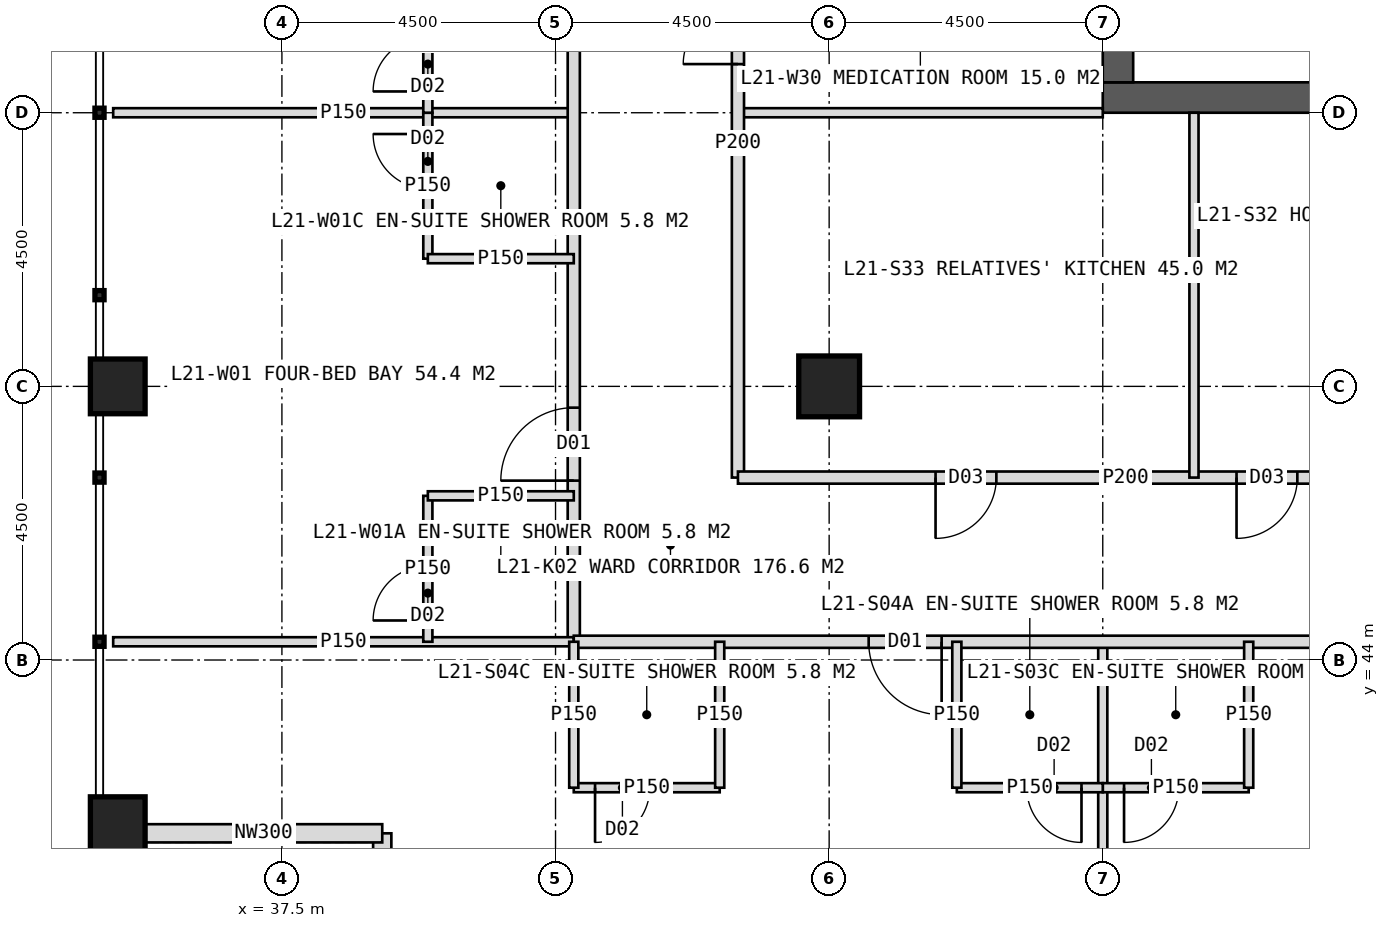
"""IFC4 building model, lengths in metres.
Left out: names, types, materials, properties, quantities, classifications, styles, units other than length and angle.
Written with IfcOpenShell. Run it as: python <this file> out.ifc"""

import sys

from ifc_helpers import new_model, si_unit, direction, frame, frame_2d, origin, origin_2d, place, context, subcontext, project, spatial, rectangle, hollow_rectangle, extrude, element, fill, save


model = new_model("IFC4")
c1 = context("Model", 3, precision=1e-05, world=origin(), true_north=direction((0.0, 1.0)))
c2 = subcontext(c1, "Body", "Model", "MODEL_VIEW")
j1 = project(units=[si_unit("LENGTHUNIT", "METRE"), si_unit("PLANEANGLEUNIT", "RADIAN")], contexts=[c1])
p1 = place(None, origin())
s1 = spatial("IfcSite", under=j1, at=p1, CompositionType="ELEMENT")
p2 = place(p1, origin())
s2 = spatial("IfcBuilding", under=s1, at=p2, CompositionType="ELEMENT")
p3 = place(p2, frame((0.0, 0.0, 91.0)))
s3 = spatial("IfcBuildingStorey", under=s2, at=p3, CompositionType="ELEMENT", Elevation=91.0)
p4 = place(p3, frame((51.0, 53.25, 0.0), z_axis=(0.0, 0.0, 1.0), x_axis=(1.0, 0.0, 0.0)))
e1 = element("IfcWall", 1, at=p4, inside=s3, PredefinedType="SHEAR", context=c2, shape_type="SweptSolid", body=[
    extrude(rectangle(XDim=18.0, YDim=0.5, at=frame_2d((9.0, 0.0))), origin(), (0.0, 0.0, 1.0), 4.0),
])
p5 = place(p4, frame((8.1, 0.0, 0.0)))
e2 = element("IfcOpeningElement", 2, at=p5, cuts=e1, PredefinedType="OPENING", context=c2, shape_type="SweptSolid", body=[
    extrude(rectangle(XDim=1.8, YDim=2.2, at=frame_2d((0.9, 1.1))), frame((0.0, 0.26, 0.0), z_axis=(0.0, -1.0, 0.0), x_axis=(1.0, 0.0, 0.0)), (0.0, 0.0, 1.0), 0.52),
])
p6 = place(p3, frame((51.25, 53.5, 0.0), z_axis=(0.0, 0.0, 1.0), x_axis=(0.0, 1.0, 0.0)))
e3 = element("IfcWall", 3, at=p6, inside=s3, PredefinedType="SHEAR", context=c2, shape_type="SweptSolid", body=[
    extrude(rectangle(XDim=17.0, YDim=0.5, at=frame_2d((8.5, 0.0))), origin(), (0.0, 0.0, 1.0), 4.0),
])
p7 = place(p6, frame((6.0, 0.0, 0.0)))
e4 = element("IfcOpeningElement", 4, at=p7, cuts=e3, PredefinedType="OPENING", context=c2, shape_type="SweptSolid", body=[
    extrude(rectangle(XDim=1.5, YDim=2.2, at=frame_2d((0.75, 1.1))), frame((0.0, 0.26, 0.0), z_axis=(0.0, -1.0, 0.0), x_axis=(1.0, 0.0, 0.0)), (0.0, 0.0, 1.0), 0.52),
])
p8 = place(p3, frame((46.5, 48.5, 0.0), z_axis=(0.0, 0.0, 1.0), x_axis=(1.0, 0.0, 0.0)))
e5 = element("IfcColumn", 5, at=p8, inside=s3, PredefinedType="COLUMN", context=c2, shape_type="SweptSolid", body=[
    extrude(hollow_rectangle(XDim=1.0, YDim=1.0, WallThickness=0.1, at=origin_2d()), origin(), (0.0, 0.0, 1.0), 4.0),
])
for number, where, z_axis, x_axis in (
    (6, (34.8, 41.3, 0.0), (0.0, 0.0, 1.0), (1.0, 0.0, 0.0)),
    (7, (34.8, 48.5, 0.0), (0.0, 0.0, 1.0), (1.0, 0.0, 0.0)),
):
    element("IfcColumn", number, at=place(p3, frame(where, z_axis=z_axis, x_axis=x_axis)), inside=s3, PredefinedType="COLUMN", context=c2, shape_type="SweptSolid", body=[
        extrude(hollow_rectangle(XDim=0.9, YDim=0.9, WallThickness=0.08, at=origin_2d()), origin(), (0.0, 0.0, 1.0), 4.0),
    ])
for number, where, z_axis, x_axis in (
    (8, (39.15, 37.25, 0.0), (0.0, 0.0, 1.0), (0.0, 1.0, 0.0)),
    (9, (39.15, 41.15, 0.0), (0.0, 0.0, 1.0), (-1.0, 0.0, 0.0)),
):
    element("IfcWall", number, at=place(p3, frame(where, z_axis=z_axis, x_axis=x_axis)), inside=s3, PredefinedType="ELEMENTEDWALL", context=c2, shape_type="SweptSolid", body=[
        extrude(rectangle(XDim=3.9, YDim=0.3, at=frame_2d((1.95, 0.0))), origin(), (0.0, 0.0, 1.0), 2.95),
    ])
p9 = place(p3, frame((42.3, 53.0, 0.0), z_axis=(0.0, 0.0, 1.0), x_axis=(-1.0, 0.0, 0.0)))
e10 = element("IfcWall", 10, at=p9, inside=s3, PredefinedType="PARTITIONING", context=c2, shape_type="SweptSolid", body=[
    extrude(rectangle(XDim=7.575, YDim=0.15, at=frame_2d((3.788, 0.0))), origin(), (0.0, 0.0, 1.0), 3.75),
])
p10 = place(p3, frame((42.3, 44.3, 0.0), z_axis=(0.0, 0.0, 1.0), x_axis=(0.0, 1.0, 0.0)))
e11 = element("IfcWall", 11, at=p10, inside=s3, PredefinedType="PARTITIONING", context=c2, shape_type="SweptSolid", body=[
    extrude(rectangle(XDim=35.4, YDim=0.2, at=frame_2d((17.7, 0.0))), origin(), (0.0, 0.0, 1.0), 3.75),
])
p11 = place(p10, frame((2.65, 0.0, 0.0)))
e12 = element("IfcOpeningElement", 12, at=p11, cuts=e11, PredefinedType="OPENING", context=c2, shape_type="SweptSolid", body=[
    extrude(rectangle(XDim=1.2, YDim=2.2, at=frame_2d((0.6, 1.1))), frame((0.0, 0.11, 0.0), z_axis=(0.0, -1.0, 0.0), x_axis=(1.0, 0.0, 0.0)), (0.0, 0.0, 1.0), 0.22),
])
p12 = place(p10, frame((11.35, 0.0, 0.0)))
e13 = element("IfcOpeningElement", 13, at=p12, cuts=e11, PredefinedType="OPENING", context=c2, shape_type="SweptSolid", body=[
    extrude(rectangle(XDim=1.2, YDim=2.2, at=frame_2d((0.6, 1.1))), frame((0.0, 0.11, 0.0), z_axis=(0.0, -1.0, 0.0), x_axis=(1.0, 0.0, 0.0)), (0.0, 0.0, 1.0), 0.22),
])
p13 = place(p10, frame((20.35, 0.0, 0.0)))
e14 = element("IfcOpeningElement", 14, at=p13, cuts=e11, PredefinedType="OPENING", context=c2, shape_type="SweptSolid", body=[
    extrude(rectangle(XDim=1.2, YDim=2.2, at=frame_2d((0.6, 1.1))), frame((0.0, 0.11, 0.0), z_axis=(0.0, -1.0, 0.0), x_axis=(1.0, 0.0, 0.0)), (0.0, 0.0, 1.0), 0.22),
])
p14 = place(p10, frame((26.35, 0.0, 0.0)))
e15 = element("IfcOpeningElement", 15, at=p14, cuts=e11, PredefinedType="OPENING", context=c2, shape_type="SweptSolid", body=[
    extrude(rectangle(XDim=1.2, YDim=2.2, at=frame_2d((0.6, 1.1))), frame((0.0, 0.11, 0.0), z_axis=(0.0, -1.0, 0.0), x_axis=(1.0, 0.0, 0.0)), (0.0, 0.0, 1.0), 0.22),
])
p15 = place(p10, frame((30.85, 0.0, 0.0)))
e16 = element("IfcOpeningElement", 16, at=p15, cuts=e11, PredefinedType="OPENING", context=c2, shape_type="SweptSolid", body=[
    extrude(rectangle(XDim=1.2, YDim=2.2, at=frame_2d((0.6, 1.1))), frame((0.0, 0.11, 0.0), z_axis=(0.0, -1.0, 0.0), x_axis=(1.0, 0.0, 0.0)), (0.0, 0.0, 1.0), 0.22),
])
p16 = place(p3, frame((42.3, 44.3, 0.0), z_axis=(0.0, 0.0, 1.0), x_axis=(-1.0, 0.0, 0.0)))
e17 = element("IfcWall", 17, at=p16, inside=s3, PredefinedType="PARTITIONING", context=c2, shape_type="SweptSolid", body=[
    extrude(rectangle(XDim=7.575, YDim=0.15, at=frame_2d((3.788, 0.0))), origin(), (0.0, 0.0, 1.0), 3.75),
])
p17 = place(p3, frame((39.9, 44.3, 0.0), z_axis=(0.0, 0.0, 1.0), x_axis=(0.0, 1.0, 0.0)))
e18 = element("IfcWall", 18, at=p17, inside=s3, PredefinedType="PARTITIONING", context=c2, shape_type="SweptSolid", body=[
    extrude(rectangle(XDim=2.4, YDim=0.15, at=frame_2d((1.2, 0.0))), origin(), (0.0, 0.0, 1.0), 3.75),
])
p18 = place(p17, frame((0.35, 0.0, 0.0)))
e19 = element("IfcOpeningElement", 19, at=p18, cuts=e18, PredefinedType="OPENING", context=c2, shape_type="SweptSolid", body=[
    extrude(rectangle(XDim=0.9, YDim=2.1, at=frame_2d((0.45, 1.05))), frame((0.0, 0.085, 0.0), z_axis=(0.0, -1.0, 0.0), x_axis=(1.0, 0.0, 0.0)), (0.0, 0.0, 1.0), 0.17),
])
p19 = place(p3, frame((42.3, 46.7, 0.0), z_axis=(0.0, 0.0, 1.0), x_axis=(-1.0, 0.0, 0.0)))
e20 = element("IfcWall", 20, at=p19, inside=s3, PredefinedType="PARTITIONING", context=c2, shape_type="SweptSolid", body=[
    extrude(rectangle(XDim=2.4, YDim=0.15, at=frame_2d((1.2, 0.0))), origin(), (0.0, 0.0, 1.0), 3.75),
])
p20 = place(p3, frame((39.9, 50.6, 0.0), z_axis=(0.0, 0.0, 1.0), x_axis=(0.0, 1.0, 0.0)))
e21 = element("IfcWall", 21, at=p20, inside=s3, PredefinedType="PARTITIONING", context=c2, shape_type="SweptSolid", body=[
    extrude(rectangle(XDim=2.4, YDim=0.15, at=frame_2d((1.2, 0.0))), origin(), (0.0, 0.0, 1.0), 3.75),
])
p21 = place(p20, frame((1.15, 0.0, 0.0)))
e22 = element("IfcOpeningElement", 22, at=p21, cuts=e21, PredefinedType="OPENING", context=c2, shape_type="SweptSolid", body=[
    extrude(rectangle(XDim=0.9, YDim=2.1, at=frame_2d((0.45, 1.05))), frame((0.0, 0.085, 0.0), z_axis=(0.0, -1.0, 0.0), x_axis=(1.0, 0.0, 0.0)), (0.0, 0.0, 1.0), 0.17),
])
p22 = place(p3, frame((42.3, 50.6, 0.0), z_axis=(0.0, 0.0, 1.0), x_axis=(-1.0, 0.0, 0.0)))
e23 = element("IfcWall", 23, at=p22, inside=s3, PredefinedType="PARTITIONING", context=c2, shape_type="SweptSolid", body=[
    extrude(rectangle(XDim=2.4, YDim=0.15, at=frame_2d((1.2, 0.0))), origin(), (0.0, 0.0, 1.0), 3.75),
])
p23 = place(p3, frame((39.9, 53.0, 0.0), z_axis=(0.0, 0.0, 1.0), x_axis=(0.0, 1.0, 0.0)))
e24 = element("IfcWall", 24, at=p23, inside=s3, PredefinedType="PARTITIONING", context=c2, shape_type="SweptSolid", body=[
    extrude(rectangle(XDim=2.4, YDim=0.15, at=frame_2d((1.2, 0.0))), origin(), (0.0, 0.0, 1.0), 3.75),
])
p24 = place(p23, frame((0.35, 0.0, 0.0)))
e25 = element("IfcOpeningElement", 25, at=p24, cuts=e24, PredefinedType="OPENING", context=c2, shape_type="SweptSolid", body=[
    extrude(rectangle(XDim=0.9, YDim=2.1, at=frame_2d((0.45, 1.05))), frame((0.0, 0.085, 0.0), z_axis=(0.0, -1.0, 0.0), x_axis=(1.0, 0.0, 0.0)), (0.0, 0.0, 1.0), 0.17),
])
p25 = place(p3, frame((51.0, 53.0, 0.0), z_axis=(0.0, 0.0, 1.0), x_axis=(-1.0, 0.0, 0.0)))
e26 = element("IfcWall", 26, at=p25, inside=s3, PredefinedType="PARTITIONING", context=c2, shape_type="SweptSolid", body=[
    extrude(rectangle(XDim=6.0, YDim=0.15, at=frame_2d((3.0, 0.0))), origin(), (0.0, 0.0, 1.0), 3.75),
])
p26 = place(p3, frame((45.0, 47.0, 0.0), z_axis=(0.0, 0.0, 1.0), x_axis=(0.0, 1.0, 0.0)))
e27 = element("IfcWall", 27, at=p26, inside=s3, PredefinedType="PARTITIONING", context=c2, shape_type="SweptSolid", body=[
    extrude(rectangle(XDim=11.0, YDim=0.2, at=frame_2d((5.5, 0.0))), origin(), (0.0, 0.0, 1.0), 3.75),
])
p27 = place(p26, frame((6.8, 0.0, 0.0)))
e28 = element("IfcOpeningElement", 28, at=p27, cuts=e27, PredefinedType="OPENING", context=c2, shape_type="SweptSolid", body=[
    extrude(rectangle(XDim=0.9, YDim=2.1, at=frame_2d((0.45, 1.05))), frame((0.0, 0.11, 0.0), z_axis=(0.0, -1.0, 0.0), x_axis=(1.0, 0.0, 0.0)), (0.0, 0.0, 1.0), 0.22),
])
p28 = place(p26, frame((8.75, 0.0, 0.0)))
e29 = element("IfcOpeningElement", 29, at=p28, cuts=e27, PredefinedType="OPENING", context=c2, shape_type="SweptSolid", body=[
    extrude(rectangle(XDim=0.9, YDim=2.1, at=frame_2d((0.45, 1.05))), frame((0.0, 0.11, 0.0), z_axis=(0.0, -1.0, 0.0), x_axis=(1.0, 0.0, 0.0)), (0.0, 0.0, 1.0), 0.22),
])
p29 = place(p3, frame((51.0, 44.3, 0.0), z_axis=(0.0, 0.0, 1.0), x_axis=(0.0, -1.0, 0.0)))
e30 = element("IfcWall", 30, at=p29, inside=s3, PredefinedType="PARTITIONING", context=c2, shape_type="SweptSolid", body=[
    extrude(rectangle(XDim=7.575, YDim=0.15, at=frame_2d((3.788, 0.0))), origin(), (0.0, 0.0, 1.0), 3.75),
])
p30 = place(p3, frame((77.7, 44.3, 0.0), z_axis=(0.0, 0.0, 1.0), x_axis=(-1.0, 0.0, 0.0)))
e31 = element("IfcWall", 31, at=p30, inside=s3, PredefinedType="PARTITIONING", context=c2, shape_type="SweptSolid", body=[
    extrude(rectangle(XDim=35.4, YDim=0.2, at=frame_2d((17.7, 0.0))), origin(), (0.0, 0.0, 1.0), 3.75),
])
p31 = place(p30, frame((2.65, 0.0, 0.0)))
e32 = element("IfcOpeningElement", 32, at=p31, cuts=e31, PredefinedType="OPENING", context=c2, shape_type="SweptSolid", body=[
    extrude(rectangle(XDim=1.2, YDim=2.2, at=frame_2d((0.6, 1.1))), frame((0.0, 0.11, 0.0), z_axis=(0.0, -1.0, 0.0), x_axis=(1.0, 0.0, 0.0)), (0.0, 0.0, 1.0), 0.22),
])
p32 = place(p30, frame((11.35, 0.0, 0.0)))
e33 = element("IfcOpeningElement", 33, at=p32, cuts=e31, PredefinedType="OPENING", context=c2, shape_type="SweptSolid", body=[
    extrude(rectangle(XDim=1.2, YDim=2.2, at=frame_2d((0.6, 1.1))), frame((0.0, 0.11, 0.0), z_axis=(0.0, -1.0, 0.0), x_axis=(1.0, 0.0, 0.0)), (0.0, 0.0, 1.0), 0.22),
])
p33 = place(p30, frame((20.35, 0.0, 0.0)))
e34 = element("IfcOpeningElement", 34, at=p33, cuts=e31, PredefinedType="OPENING", context=c2, shape_type="SweptSolid", body=[
    extrude(rectangle(XDim=1.2, YDim=2.2, at=frame_2d((0.6, 1.1))), frame((0.0, 0.11, 0.0), z_axis=(0.0, -1.0, 0.0), x_axis=(1.0, 0.0, 0.0)), (0.0, 0.0, 1.0), 0.22),
])
p34 = place(p30, frame((29.35, 0.0, 0.0)))
e35 = element("IfcOpeningElement", 35, at=p34, cuts=e31, PredefinedType="OPENING", context=c2, shape_type="SweptSolid", body=[
    extrude(rectangle(XDim=1.2, YDim=2.2, at=frame_2d((0.6, 1.1))), frame((0.0, 0.11, 0.0), z_axis=(0.0, -1.0, 0.0), x_axis=(1.0, 0.0, 0.0)), (0.0, 0.0, 1.0), 0.22),
])
p35 = place(p3, frame((53.4, 41.9, 0.0), z_axis=(0.0, 0.0, 1.0), x_axis=(-1.0, 0.0, 0.0)))
e36 = element("IfcWall", 36, at=p35, inside=s3, PredefinedType="PARTITIONING", context=c2, shape_type="SweptSolid", body=[
    extrude(rectangle(XDim=2.4, YDim=0.15, at=frame_2d((1.2, 0.0))), origin(), (0.0, 0.0, 1.0), 3.75),
])
p36 = place(p35, frame((1.15, 0.0, 0.0)))
e37 = element("IfcOpeningElement", 37, at=p36, cuts=e36, PredefinedType="OPENING", context=c2, shape_type="SweptSolid", body=[
    extrude(rectangle(XDim=0.9, YDim=2.1, at=frame_2d((0.45, 1.05))), frame((0.0, 0.085, 0.0), z_axis=(0.0, -1.0, 0.0), x_axis=(1.0, 0.0, 0.0)), (0.0, 0.0, 1.0), 0.17),
])
p37 = place(p3, frame((53.4, 44.3, 0.0), z_axis=(0.0, 0.0, 1.0), x_axis=(0.0, -1.0, 0.0)))
e38 = element("IfcWall", 38, at=p37, inside=s3, PredefinedType="PARTITIONING", context=c2, shape_type="SweptSolid", body=[
    extrude(rectangle(XDim=2.4, YDim=0.15, at=frame_2d((1.2, 0.0))), origin(), (0.0, 0.0, 1.0), 3.75),
])
p38 = place(p3, frame((51.0, 41.9, 0.0), z_axis=(0.0, 0.0, 1.0), x_axis=(-1.0, 0.0, 0.0)))
e39 = element("IfcWall", 39, at=p38, inside=s3, PredefinedType="PARTITIONING", context=c2, shape_type="SweptSolid", body=[
    extrude(rectangle(XDim=2.4, YDim=0.15, at=frame_2d((1.2, 0.0))), origin(), (0.0, 0.0, 1.0), 3.75),
])
p39 = place(p38, frame((0.35, 0.0, 0.0)))
e40 = element("IfcOpeningElement", 40, at=p39, cuts=e39, PredefinedType="OPENING", context=c2, shape_type="SweptSolid", body=[
    extrude(rectangle(XDim=0.9, YDim=2.1, at=frame_2d((0.45, 1.05))), frame((0.0, 0.085, 0.0), z_axis=(0.0, -1.0, 0.0), x_axis=(1.0, 0.0, 0.0)), (0.0, 0.0, 1.0), 0.17),
])
p40 = place(p3, frame((48.6, 44.3, 0.0), z_axis=(0.0, 0.0, 1.0), x_axis=(0.0, -1.0, 0.0)))
e41 = element("IfcWall", 41, at=p40, inside=s3, PredefinedType="PARTITIONING", context=c2, shape_type="SweptSolid", body=[
    extrude(rectangle(XDim=2.4, YDim=0.15, at=frame_2d((1.2, 0.0))), origin(), (0.0, 0.0, 1.0), 3.75),
])
p41 = place(p3, frame((44.7, 41.9, 0.0), z_axis=(0.0, 0.0, 1.0), x_axis=(-1.0, 0.0, 0.0)))
e42 = element("IfcWall", 42, at=p41, inside=s3, PredefinedType="PARTITIONING", context=c2, shape_type="SweptSolid", body=[
    extrude(rectangle(XDim=2.4, YDim=0.15, at=frame_2d((1.2, 0.0))), origin(), (0.0, 0.0, 1.0), 3.75),
])
p42 = place(p41, frame((1.15, 0.0, 0.0)))
e43 = element("IfcOpeningElement", 43, at=p42, cuts=e42, PredefinedType="OPENING", context=c2, shape_type="SweptSolid", body=[
    extrude(rectangle(XDim=0.9, YDim=2.1, at=frame_2d((0.45, 1.05))), frame((0.0, 0.085, 0.0), z_axis=(0.0, -1.0, 0.0), x_axis=(1.0, 0.0, 0.0)), (0.0, 0.0, 1.0), 0.17),
])
for number, where, z_axis, x_axis in (
    (44, (44.7, 44.3, 0.0), (0.0, 0.0, 1.0), (0.0, -1.0, 0.0)),
    (45, (42.3, 44.3, 0.0), (0.0, 0.0, 1.0), (0.0, -1.0, 0.0)),
):
    element("IfcWall", number, at=place(p3, frame(where, z_axis=z_axis, x_axis=x_axis)), inside=s3, PredefinedType="PARTITIONING", context=c2, shape_type="SweptSolid", body=[
        extrude(rectangle(XDim=2.4, YDim=0.15, at=frame_2d((1.2, 0.0))), origin(), (0.0, 0.0, 1.0), 3.75),
    ])
p43 = place(p3, frame((57.75, 47.0, 0.0), z_axis=(0.0, 0.0, 1.0), x_axis=(-1.0, 0.0, 0.0)))
e46 = element("IfcWall", 46, at=p43, inside=s3, PredefinedType="PARTITIONING", context=c2, shape_type="SweptSolid", body=[
    extrude(rectangle(XDim=12.75, YDim=0.2, at=frame_2d((6.375, 0.0))), origin(), (0.0, 0.0, 1.0), 3.75),
])
p44 = place(p43, frame((3.55, 0.0, 0.0)))
e47 = element("IfcOpeningElement", 47, at=p44, cuts=e46, PredefinedType="OPENING", context=c2, shape_type="SweptSolid", body=[
    extrude(rectangle(XDim=1.0, YDim=2.1, at=frame_2d((0.5, 1.05))), frame((0.0, 0.11, 0.0), z_axis=(0.0, -1.0, 0.0), x_axis=(1.0, 0.0, 0.0)), (0.0, 0.0, 1.0), 0.22),
])
p45 = place(p43, frame((8.5, 0.0, 0.0)))
e48 = element("IfcOpeningElement", 48, at=p45, cuts=e46, PredefinedType="OPENING", context=c2, shape_type="SweptSolid", body=[
    extrude(rectangle(XDim=1.0, YDim=2.1, at=frame_2d((0.5, 1.05))), frame((0.0, 0.11, 0.0), z_axis=(0.0, -1.0, 0.0), x_axis=(1.0, 0.0, 0.0)), (0.0, 0.0, 1.0), 0.22),
])
p46 = place(p3, frame((52.5, 53.0, 0.0), z_axis=(0.0, 0.0, 1.0), x_axis=(0.0, -1.0, 0.0)))
e49 = element("IfcWall", 49, at=p46, inside=s3, PredefinedType="PARTITIONING", context=c2, shape_type="SweptSolid", body=[
    extrude(rectangle(XDim=6.0, YDim=0.15, at=frame_2d((3.0, 0.0))), origin(), (0.0, 0.0, 1.0), 3.75),
])
p47 = place(p11, origin())
e50 = element("IfcDoor", 50, at=p47, inside=s3, OperationType="SINGLE_SWING_LEFT", PredefinedType="DOOR", context=c2, shape_type="SweptSolid", body=[
    extrude(rectangle(XDim=1.2, YDim=2.2, at=frame_2d((0.6, 1.1))), frame((0.0, 0.025, 0.0), z_axis=(0.0, -1.0, 0.0), x_axis=(1.0, 0.0, 0.0)), (0.0, 0.0, 1.0), 0.05),
])
fill(e12, e50)
p48 = place(p18, origin())
e51 = element("IfcDoor", 51, at=p48, inside=s3, OperationType="SINGLE_SWING_LEFT", PredefinedType="DOOR", context=c2, shape_type="SweptSolid", body=[
    extrude(rectangle(XDim=0.9, YDim=2.1, at=frame_2d((0.45, 1.05))), frame((0.0, 0.025, 0.0), z_axis=(0.0, -1.0, 0.0), x_axis=(1.0, 0.0, 0.0)), (0.0, 0.0, 1.0), 0.05),
])
fill(e19, e51)
p49 = place(p21, origin())
e52 = element("IfcDoor", 52, at=p49, inside=s3, OperationType="SINGLE_SWING_RIGHT", PredefinedType="DOOR", context=c2, shape_type="SweptSolid", body=[
    extrude(rectangle(XDim=0.9, YDim=2.1, at=frame_2d((0.45, 1.05))), frame((0.0, 0.025, 0.0), z_axis=(0.0, -1.0, 0.0), x_axis=(1.0, 0.0, 0.0)), (0.0, 0.0, 1.0), 0.05),
])
fill(e22, e52)
p50 = place(p24, origin())
e53 = element("IfcDoor", 53, at=p50, inside=s3, OperationType="SINGLE_SWING_LEFT", PredefinedType="DOOR", context=c2, shape_type="SweptSolid", body=[
    extrude(rectangle(XDim=0.9, YDim=2.1, at=frame_2d((0.45, 1.05))), frame((0.0, 0.025, 0.0), z_axis=(0.0, -1.0, 0.0), x_axis=(1.0, 0.0, 0.0)), (0.0, 0.0, 1.0), 0.05),
])
fill(e25, e53)
p51 = place(p27, origin())
e54 = element("IfcDoor", 54, at=p51, inside=s3, OperationType="SINGLE_SWING_LEFT", PredefinedType="DOOR", context=c2, shape_type="SweptSolid", body=[
    extrude(rectangle(XDim=0.9, YDim=2.1, at=frame_2d((0.45, 1.05))), frame((0.0, 0.025, 0.0), z_axis=(0.0, -1.0, 0.0), x_axis=(1.0, 0.0, 0.0)), (0.0, 0.0, 1.0), 0.05),
])
fill(e28, e54)
p52 = place(p36, origin())
e55 = element("IfcDoor", 55, at=p52, inside=s3, OperationType="SINGLE_SWING_RIGHT", PredefinedType="DOOR", context=c2, shape_type="SweptSolid", body=[
    extrude(rectangle(XDim=0.9, YDim=2.1, at=frame_2d((0.45, 1.05))), frame((0.0, 0.025, 0.0), z_axis=(0.0, -1.0, 0.0), x_axis=(1.0, 0.0, 0.0)), (0.0, 0.0, 1.0), 0.05),
])
fill(e37, e55)
p53 = place(p34, origin())
e56 = element("IfcDoor", 56, at=p53, inside=s3, OperationType="SINGLE_SWING_LEFT", PredefinedType="DOOR", context=c2, shape_type="SweptSolid", body=[
    extrude(rectangle(XDim=1.2, YDim=2.2, at=frame_2d((0.6, 1.1))), frame((0.0, 0.025, 0.0), z_axis=(0.0, -1.0, 0.0), x_axis=(1.0, 0.0, 0.0)), (0.0, 0.0, 1.0), 0.05),
])
fill(e35, e56)
p54 = place(p39, origin())
e57 = element("IfcDoor", 57, at=p54, inside=s3, OperationType="SINGLE_SWING_LEFT", PredefinedType="DOOR", context=c2, shape_type="SweptSolid", body=[
    extrude(rectangle(XDim=0.9, YDim=2.1, at=frame_2d((0.45, 1.05))), frame((0.0, 0.025, 0.0), z_axis=(0.0, -1.0, 0.0), x_axis=(1.0, 0.0, 0.0)), (0.0, 0.0, 1.0), 0.05),
])
fill(e40, e57)
p55 = place(p42, origin())
e58 = element("IfcDoor", 58, at=p55, inside=s3, OperationType="SINGLE_SWING_RIGHT", PredefinedType="DOOR", context=c2, shape_type="SweptSolid", body=[
    extrude(rectangle(XDim=0.9, YDim=2.1, at=frame_2d((0.45, 1.05))), frame((0.0, 0.025, 0.0), z_axis=(0.0, -1.0, 0.0), x_axis=(1.0, 0.0, 0.0)), (0.0, 0.0, 1.0), 0.05),
])
fill(e43, e58)
p56 = place(p44, origin())
e59 = element("IfcDoor", 59, at=p56, inside=s3, OperationType="SINGLE_SWING_RIGHT", PredefinedType="DOOR", context=c2, shape_type="SweptSolid", body=[
    extrude(rectangle(XDim=1.0, YDim=2.1, at=frame_2d((0.5, 1.05))), frame((0.0, 0.025, 0.0), z_axis=(0.0, -1.0, 0.0), x_axis=(1.0, 0.0, 0.0)), (0.0, 0.0, 1.0), 0.05),
])
fill(e47, e59)
p57 = place(p45, origin())
e60 = element("IfcDoor", 60, at=p57, inside=s3, OperationType="SINGLE_SWING_RIGHT", PredefinedType="DOOR", context=c2, shape_type="SweptSolid", body=[
    extrude(rectangle(XDim=1.0, YDim=2.1, at=frame_2d((0.5, 1.05))), frame((0.0, 0.025, 0.0), z_axis=(0.0, -1.0, 0.0), x_axis=(1.0, 0.0, 0.0)), (0.0, 0.0, 1.0), 0.05),
])
fill(e48, e60)
save(model, sys.argv[1])
